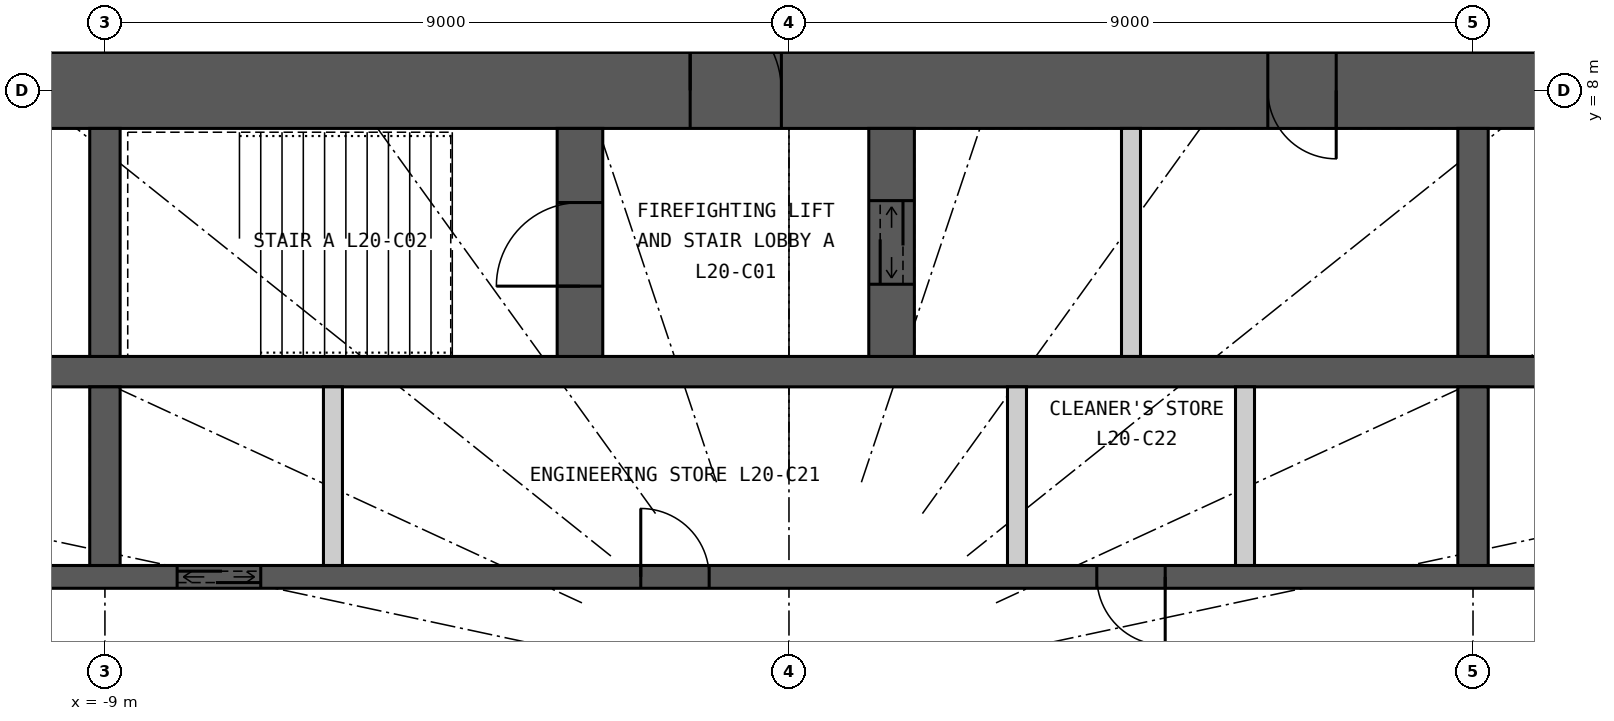
"""IFC4 building model, lengths in metres.
Left out: names, types, materials, properties, quantities, classifications, styles, units other than length and angle.
Written with IfcOpenShell. Run it as: python <this file> out.ifc"""

import sys

from ifc_helpers import new_model, si_unit, direction, frame, frame_2d, origin, place, context, subcontext, project, spatial, rectangle, extrude, element, fill, save


model = new_model("IFC4")
c1 = context("Model", 3, precision=1e-05, world=origin(), true_north=direction((0.0, 1.0)))
c2 = subcontext(c1, "Body", "Model", "MODEL_VIEW")
j1 = project(units=[si_unit("LENGTHUNIT", "METRE"), si_unit("PLANEANGLEUNIT", "RADIAN")], contexts=[c1])
p1 = place(None, origin())
s1 = spatial("IfcSite", under=j1, at=p1, CompositionType="ELEMENT")
p2 = place(p1, origin())
s2 = spatial("IfcBuilding", under=s1, at=p2, CompositionType="ELEMENT")
p3 = place(p2, frame((0.0, 0.0, 80.4)))
s3 = spatial("IfcBuildingStorey", under=s2, at=p3, CompositionType="ELEMENT", Elevation=80.4)
p4 = place(p3, frame((-12.5, 8.0, 0.0), z_axis=(0.0, 0.0, 1.0), x_axis=(1.0, 0.0, 0.0)))
e1 = element("IfcWall", 1, at=p4, inside=s3, PredefinedType="SHEAR", context=c2, shape_type="SweptSolid", body=[
    extrude(rectangle(XDim=25.0, YDim=1.0, at=frame_2d((12.5, 0.0))), origin(), (0.0, 0.0, 1.0), 3.3),
])
p5 = place(p4, frame((11.2, 0.0, 0.0)))
e2 = element("IfcOpeningElement", 2, at=p5, cuts=e1, PredefinedType="OPENING", context=c2, shape_type="SweptSolid", body=[
    extrude(rectangle(XDim=1.2, YDim=2.2, at=frame_2d((0.6, 1.1))), frame((0.0, 0.51, 0.0), z_axis=(0.0, -1.0, 0.0), x_axis=(1.0, 0.0, 0.0)), (0.0, 0.0, 1.0), 1.02),
])
p6 = place(p4, frame((18.8, 0.0, 0.0)))
e3 = element("IfcOpeningElement", 3, at=p6, cuts=e1, PredefinedType="OPENING", context=c2, shape_type="SweptSolid", body=[
    extrude(rectangle(XDim=0.9, YDim=2.2, at=frame_2d((0.45, 1.1))), frame((0.0, 0.51, 0.0), z_axis=(0.0, -1.0, 0.0), x_axis=(1.0, 0.0, 0.0)), (0.0, 0.0, 1.0), 1.02),
])
p7 = place(p3, frame((-11.5, 4.3, 0.0), z_axis=(0.0, 0.0, 1.0), x_axis=(1.0, 0.0, 0.0)))
e4 = element("IfcWall", 4, at=p7, inside=s3, PredefinedType="SHEAR", context=c2, shape_type="SweptSolid", body=[
    extrude(rectangle(XDim=23.0, YDim=0.4, at=frame_2d((11.5, 0.0))), origin(), (0.0, 0.0, 1.0), 3.3),
])
p8 = place(p3, frame((-11.5, 1.6, 0.0), z_axis=(0.0, 0.0, 1.0), x_axis=(1.0, 0.0, 0.0)))
e5 = element("IfcWall", 5, at=p8, inside=s3, PredefinedType="SHEAR", context=c2, shape_type="SweptSolid", body=[
    extrude(rectangle(XDim=23.0, YDim=0.3, at=frame_2d((11.5, 0.0))), origin(), (0.0, 0.0, 1.0), 3.3),
])
p9 = place(p8, frame((0.45, 0.0, 0.0)))
e6 = element("IfcOpeningElement", 6, at=p9, cuts=e5, PredefinedType="OPENING", context=c2, shape_type="SweptSolid", body=[
    extrude(rectangle(XDim=1.1, YDim=2.2, at=frame_2d((0.55, 1.1))), frame((0.0, 0.16, 0.0), z_axis=(0.0, -1.0, 0.0), x_axis=(1.0, 0.0, 0.0)), (0.0, 0.0, 1.0), 0.32),
])
p10 = place(p8, frame((3.45, 0.0, 0.0)))
e7 = element("IfcOpeningElement", 7, at=p10, cuts=e5, PredefinedType="OPENING", context=c2, shape_type="SweptSolid", body=[
    extrude(rectangle(XDim=1.1, YDim=2.2, at=frame_2d((0.55, 1.1))), frame((0.0, 0.16, 0.0), z_axis=(0.0, -1.0, 0.0), x_axis=(1.0, 0.0, 0.0)), (0.0, 0.0, 1.0), 0.32),
])
p11 = place(p8, frame((9.55, 0.0, 0.0)))
e8 = element("IfcOpeningElement", 8, at=p11, cuts=e5, PredefinedType="OPENING", context=c2, shape_type="SweptSolid", body=[
    extrude(rectangle(XDim=0.9, YDim=2.2, at=frame_2d((0.45, 1.1))), frame((0.0, 0.16, 0.0), z_axis=(0.0, -1.0, 0.0), x_axis=(1.0, 0.0, 0.0)), (0.0, 0.0, 1.0), 0.32),
])
p12 = place(p8, frame((15.55, 0.0, 0.0)))
e9 = element("IfcOpeningElement", 9, at=p12, cuts=e5, PredefinedType="OPENING", context=c2, shape_type="SweptSolid", body=[
    extrude(rectangle(XDim=0.9, YDim=2.2, at=frame_2d((0.45, 1.1))), frame((0.0, 0.16, 0.0), z_axis=(0.0, -1.0, 0.0), x_axis=(1.0, 0.0, 0.0)), (0.0, 0.0, 1.0), 0.32),
])
p13 = place(p3, frame((-9.0, 4.5, 0.0), z_axis=(0.0, 0.0, 1.0), x_axis=(0.0, 1.0, 0.0)))
e10 = element("IfcWall", 10, at=p13, inside=s3, PredefinedType="SHEAR", context=c2, shape_type="SweptSolid", body=[
    extrude(rectangle(XDim=3.0, YDim=0.4, at=frame_2d((1.5, 0.0))), origin(), (0.0, 0.0, 1.0), 3.3),
])
p14 = place(p3, frame((-9.0, 1.75, 0.0), z_axis=(0.0, 0.0, 1.0), x_axis=(0.0, 1.0, 0.0)))
e11 = element("IfcWall", 11, at=p14, inside=s3, PredefinedType="SHEAR", context=c2, shape_type="SweptSolid", body=[
    extrude(rectangle(XDim=2.35, YDim=0.4, at=frame_2d((1.175, 0.0))), origin(), (0.0, 0.0, 1.0), 3.3),
])
p15 = place(p3, frame((9.0, 4.5, 0.0), z_axis=(0.0, 0.0, 1.0), x_axis=(0.0, 1.0, 0.0)))
e12 = element("IfcWall", 12, at=p15, inside=s3, PredefinedType="SHEAR", context=c2, shape_type="SweptSolid", body=[
    extrude(rectangle(XDim=3.0, YDim=0.4, at=frame_2d((1.5, 0.0))), origin(), (0.0, 0.0, 1.0), 3.3),
])
p16 = place(p3, frame((9.0, 1.75, 0.0), z_axis=(0.0, 0.0, 1.0), x_axis=(0.0, 1.0, 0.0)))
e13 = element("IfcWall", 13, at=p16, inside=s3, PredefinedType="SHEAR", context=c2, shape_type="SweptSolid", body=[
    extrude(rectangle(XDim=2.35, YDim=0.4, at=frame_2d((1.175, 0.0))), origin(), (0.0, 0.0, 1.0), 3.3),
])
p17 = place(p3, frame((-2.75, 4.5, 0.0), z_axis=(0.0, 0.0, 1.0), x_axis=(0.0, 1.0, 0.0)))
e14 = element("IfcWall", 14, at=p17, inside=s3, PredefinedType="SHEAR", context=c2, shape_type="SweptSolid", body=[
    extrude(rectangle(XDim=3.0, YDim=0.6, at=frame_2d((1.5, 0.0))), origin(), (0.0, 0.0, 1.0), 3.3),
])
p18 = place(p17, frame((0.925, 0.0, 0.0)))
e15 = element("IfcOpeningElement", 15, at=p18, cuts=e14, PredefinedType="OPENING", context=c2, shape_type="SweptSolid", body=[
    extrude(rectangle(XDim=1.1, YDim=2.2, at=frame_2d((0.55, 1.1))), frame((0.0, 0.31, 0.0), z_axis=(0.0, -1.0, 0.0), x_axis=(1.0, 0.0, 0.0)), (0.0, 0.0, 1.0), 0.62),
])
p19 = place(p3, frame((1.35, 4.5, 0.0), z_axis=(0.0, 0.0, 1.0), x_axis=(0.0, 1.0, 0.0)))
e16 = element("IfcWall", 16, at=p19, inside=s3, PredefinedType="SHEAR", context=c2, shape_type="SweptSolid", body=[
    extrude(rectangle(XDim=3.0, YDim=0.6, at=frame_2d((1.5, 0.0))), origin(), (0.0, 0.0, 1.0), 3.3),
])
p20 = place(p19, frame((0.95, 0.0, 0.0)))
e17 = element("IfcOpeningElement", 17, at=p20, cuts=e16, PredefinedType="OPENING", context=c2, shape_type="SweptSolid", body=[
    extrude(rectangle(XDim=1.1, YDim=2.2, at=frame_2d((0.55, 1.1))), frame((0.0, 0.31, 0.0), z_axis=(0.0, -1.0, 0.0), x_axis=(1.0, 0.0, 0.0)), (0.0, 0.0, 1.0), 0.62),
])
p21 = place(p3, frame((4.5, 4.5, 0.0), z_axis=(0.0, 0.0, 1.0), x_axis=(0.0, 1.0, 0.0)))
e18 = element("IfcWall", 18, at=p21, inside=s3, PredefinedType="PARTITIONING", context=c2, shape_type="SweptSolid", body=[
    extrude(rectangle(XDim=3.0, YDim=0.25, at=frame_2d((1.5, 0.0))), origin(), (0.0, 0.0, 1.0), 3.3),
])
for number, where, z_axis, x_axis in (
    (19, (-6.0, 1.75, 0.0), (0.0, 0.0, 1.0), (0.0, 1.0, 0.0)),
    (20, (3.0, 1.75, 0.0), (0.0, 0.0, 1.0), (0.0, 1.0, 0.0)),
    (21, (6.0, 1.75, 0.0), (0.0, 0.0, 1.0), (0.0, 1.0, 0.0)),
):
    element("IfcWall", number, at=place(p3, frame(where, z_axis=z_axis, x_axis=x_axis)), inside=s3, PredefinedType="PARTITIONING", context=c2, shape_type="SweptSolid", body=[
        extrude(rectangle(XDim=2.35, YDim=0.25, at=frame_2d((1.175, 0.0))), origin(), (0.0, 0.0, 1.0), 3.3),
    ])
p22 = place(p5, origin())
e22 = element("IfcDoor", 22, at=p22, inside=s3, OperationType="SINGLE_SWING_LEFT", PredefinedType="DOOR", context=c2, shape_type="SweptSolid", body=[
    extrude(rectangle(XDim=1.2, YDim=2.2, at=frame_2d((0.6, 1.1))), frame((0.0, 0.025, 0.0), z_axis=(0.0, -1.0, 0.0), x_axis=(1.0, 0.0, 0.0)), (0.0, 0.0, 1.0), 0.05),
])
fill(e2, e22)
p23 = place(p18, origin())
e23 = element("IfcDoor", 23, at=p23, inside=s3, OperationType="SINGLE_SWING_LEFT", PredefinedType="DOOR", context=c2, shape_type="SweptSolid", body=[
    extrude(rectangle(XDim=1.1, YDim=2.2, at=frame_2d((0.55, 1.1))), frame((0.0, 0.025, 0.0), z_axis=(0.0, -1.0, 0.0), x_axis=(1.0, 0.0, 0.0)), (0.0, 0.0, 1.0), 0.05),
])
fill(e15, e23)
p24 = place(p20, origin())
e24 = element("IfcDoor", 24, at=p24, inside=s3, OperationType="DOUBLE_DOOR_SLIDING", PredefinedType="DOOR", context=c2, shape_type="SweptSolid", body=[
    extrude(rectangle(XDim=1.1, YDim=2.2, at=frame_2d((0.55, 1.1))), frame((0.0, 0.025, 0.0), z_axis=(0.0, -1.0, 0.0), x_axis=(1.0, 0.0, 0.0)), (0.0, 0.0, 1.0), 0.05),
])
fill(e17, e24)
p25 = place(p6, origin())
e25 = element("IfcDoor", 25, at=p25, inside=s3, OperationType="SINGLE_SWING_RIGHT", PredefinedType="DOOR", context=c2, shape_type="SweptSolid", body=[
    extrude(rectangle(XDim=0.9, YDim=2.2, at=frame_2d((0.45, 1.1))), frame((0.0, 0.025, 0.0), z_axis=(0.0, -1.0, 0.0), x_axis=(1.0, 0.0, 0.0)), (0.0, 0.0, 1.0), 0.05),
])
fill(e3, e25)
p26 = place(p10, origin())
e26 = element("IfcDoor", 26, at=p26, inside=s3, OperationType="DOUBLE_DOOR_SLIDING", PredefinedType="DOOR", context=c2, shape_type="SweptSolid", body=[
    extrude(rectangle(XDim=1.1, YDim=2.2, at=frame_2d((0.55, 1.1))), frame((0.0, 0.025, 0.0), z_axis=(0.0, -1.0, 0.0), x_axis=(1.0, 0.0, 0.0)), (0.0, 0.0, 1.0), 0.05),
])
fill(e7, e26)
p27 = place(p11, origin())
e27 = element("IfcDoor", 27, at=p27, inside=s3, OperationType="SINGLE_SWING_LEFT", PredefinedType="DOOR", context=c2, shape_type="SweptSolid", body=[
    extrude(rectangle(XDim=0.9, YDim=2.2, at=frame_2d((0.45, 1.1))), frame((0.0, 0.025, 0.0), z_axis=(0.0, -1.0, 0.0), x_axis=(1.0, 0.0, 0.0)), (0.0, 0.0, 1.0), 0.05),
])
fill(e8, e27)
p28 = place(p12, origin())
e28 = element("IfcDoor", 28, at=p28, inside=s3, OperationType="SINGLE_SWING_RIGHT", PredefinedType="DOOR", context=c2, shape_type="SweptSolid", body=[
    extrude(rectangle(XDim=0.9, YDim=2.2, at=frame_2d((0.45, 1.1))), frame((0.0, 0.025, 0.0), z_axis=(0.0, -1.0, 0.0), x_axis=(1.0, 0.0, 0.0)), (0.0, 0.0, 1.0), 0.05),
])
fill(e9, e28)
save(model, sys.argv[1])
